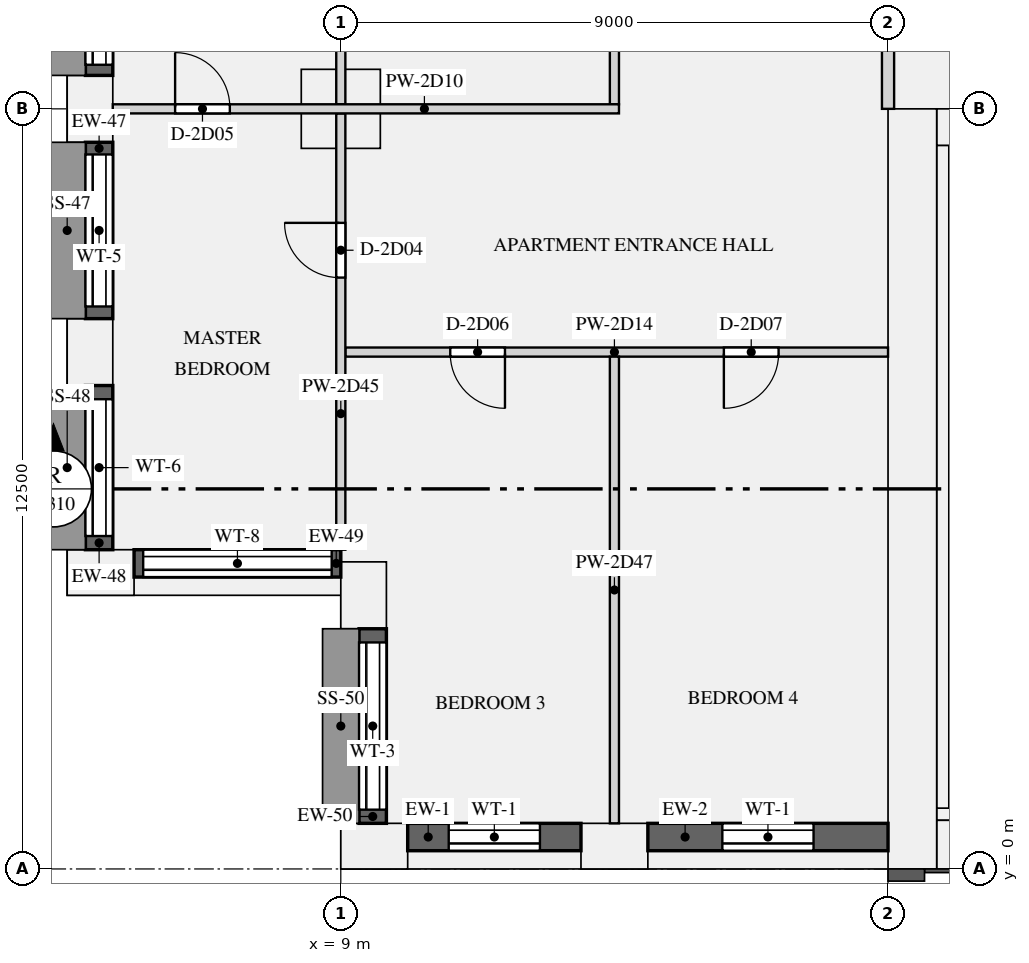
"""IFC4 building model, lengths in metres.
Left out: names, types, materials, properties, quantities, classifications, styles, units other than length and angle.
Written with IfcOpenShell. Run it as: python <this file> out.ifc"""

import sys

from ifc_helpers import new_model, si_unit, direction, frame, frame_2d, origin, origin_2d, place, context, subcontext, project, spatial, rectangle, extrude, element, fill, save


model = new_model("IFC4")
c1 = context("Model", 3, precision=1e-05, world=origin(), true_north=direction((0.0, 1.0)))
c2 = subcontext(c1, "Body", "Model", "MODEL_VIEW")
j1 = project(units=[si_unit("LENGTHUNIT", "METRE"), si_unit("PLANEANGLEUNIT", "RADIAN")], contexts=[c1])
p1 = place(None, origin())
s1 = spatial("IfcSite", under=j1, at=p1, CompositionType="ELEMENT")
p2 = place(p1, origin())
s2 = spatial("IfcBuilding", under=s1, at=p2, CompositionType="ELEMENT")
p3 = place(p2, frame((0.0, 0.0, 111.9)))
s3 = spatial("IfcBuildingStorey", under=s2, at=p3, CompositionType="ELEMENT", Elevation=111.9)
for number, where, z_axis, x_axis in (
    (1, (9.55, 0.375, 0.0), (0.0, 0.0, 1.0), (1.0, 0.0, 0.0)),
    (2, (13.5, 0.375, 0.0), (0.0, 0.0, 1.0), (1.0, 0.0, 0.0)),
    (3, (4.875, 12.5, 0.0), (0.0, 0.0, 1.0), (0.0, -1.0, 0.0)),
    (4, (4.875, 8.5, 0.0), (0.0, 0.0, 1.0), (0.0, -1.0, 0.0)),
    (5, (5.05, 4.875, 0.0), (0.0, 0.0, 1.0), (1.0, 0.0, 0.0)),
    (6, (9.375, 4.5, 0.0), (0.0, 0.0, 1.0), (0.0, -1.0, 0.0)),
):
    element("IfcColumn", number, at=place(p3, frame(where, z_axis=z_axis, x_axis=x_axis)), inside=s3, PredefinedType="USERDEFINED", context=c2, shape_type="SweptSolid", body=[
        extrude(rectangle(XDim=1.1, YDim=0.75, at=origin_2d()), origin(), (0.0, 0.0, 1.0), 3.15),
    ])
p4 = place(p3, frame((9.0, 12.5, 0.0), z_axis=(0.0, 0.0, 1.0), x_axis=(1.0, 0.0, 0.0)))
e7 = element("IfcColumn", 7, at=p4, inside=s3, PredefinedType="COLUMN", context=c2, shape_type="SweptSolid", body=[
    extrude(rectangle(XDim=1.3, YDim=1.3, at=origin_2d()), origin(), (0.0, 0.0, 1.0), 3.15),
])
p5 = place(p3, frame((18.4, 0.0, 0.0), z_axis=(0.0, 0.0, 1.0), x_axis=(0.0, 1.0, 0.0)))
e8 = element("IfcWall", 8, at=p5, inside=s3, PredefinedType="SHEAR", context=c2, shape_type="SweptSolid", body=[
    extrude(rectangle(XDim=12.5, YDim=0.8, at=frame_2d((6.25, 0.0))), origin(), (0.0, 0.0, 1.0), 3.15),
])
p6 = place(p3, frame((18.8, 0.4, 0.0), z_axis=(0.0, 0.0, 1.0), x_axis=(1.0, 0.0, 0.0)))
e9 = element("IfcWall", 9, at=p6, inside=s3, PredefinedType="SHEAR", context=c2, shape_type="SweptSolid", body=[
    extrude(rectangle(XDim=34.4, YDim=0.8, at=frame_2d((17.2, 0.0))), origin(), (0.0, 0.0, 1.0), 3.15),
])
p7 = place(p3, frame((18.8, 12.2, 0.0), z_axis=(0.0, 0.0, 1.0), x_axis=(1.0, 0.0, 0.0)))
e10 = element("IfcWall", 10, at=p7, inside=s3, PredefinedType="SHEAR", context=c2, shape_type="SweptSolid", body=[
    extrude(rectangle(XDim=34.4, YDim=0.6, at=frame_2d((17.2, 0.0))), origin(), (0.0, 0.0, 1.0), 3.15),
])
p8 = place(p7, frame((24.375, 0.0, 0.0)))
e11 = element("IfcOpeningElement", 11, at=p8, cuts=e10, PredefinedType="OPENING", context=c2, shape_type="SweptSolid", body=[
    extrude(rectangle(XDim=1.1, YDim=2.1, at=frame_2d((0.55, 1.05))), frame((0.0, 0.31, 0.0), z_axis=(0.0, -1.0, 0.0), x_axis=(1.0, 0.0, 0.0)), (0.0, 0.0, 1.0), 0.62),
])
p9 = place(p7, frame((26.625, 0.0, 0.0)))
e12 = element("IfcOpeningElement", 12, at=p9, cuts=e10, PredefinedType="OPENING", context=c2, shape_type="SweptSolid", body=[
    extrude(rectangle(XDim=1.1, YDim=2.1, at=frame_2d((0.55, 1.05))), frame((0.0, 0.31, 0.0), z_axis=(0.0, -1.0, 0.0), x_axis=(1.0, 0.0, 0.0)), (0.0, 0.0, 1.0), 0.62),
])
p10 = place(p7, frame((28.875, 0.0, 0.0)))
e13 = element("IfcOpeningElement", 13, at=p10, cuts=e10, PredefinedType="OPENING", context=c2, shape_type="SweptSolid", body=[
    extrude(rectangle(XDim=1.1, YDim=2.1, at=frame_2d((0.55, 1.05))), frame((0.0, 0.31, 0.0), z_axis=(0.0, -1.0, 0.0), x_axis=(1.0, 0.0, 0.0)), (0.0, 0.0, 1.0), 0.62),
])
p11 = place(p7, frame((8.75, 0.0, 0.0)))
e14 = element("IfcOpeningElement", 14, at=p11, cuts=e10, PredefinedType="OPENING", context=c2, shape_type="SweptSolid", body=[
    extrude(rectangle(XDim=0.9, YDim=2.1, at=frame_2d((0.45, 1.05))), frame((0.0, 0.31, 0.0), z_axis=(0.0, -1.0, 0.0), x_axis=(1.0, 0.0, 0.0)), (0.0, 0.0, 1.0), 0.62),
])
p12 = place(p7, frame((1.35, 0.0, 0.0)))
e15 = element("IfcOpeningElement", 15, at=p12, cuts=e10, PredefinedType="OPENING", context=c2, shape_type="SweptSolid", body=[
    extrude(rectangle(XDim=1.2, YDim=2.1, at=frame_2d((0.6, 1.05))), frame((0.0, 0.31, 0.0), z_axis=(0.0, -1.0, 0.0), x_axis=(1.0, 0.0, 0.0)), (0.0, 0.0, 1.0), 0.62),
])
p13 = place(p7, frame((31.85, 0.0, 0.0)))
e16 = element("IfcOpeningElement", 16, at=p13, cuts=e10, PredefinedType="OPENING", context=c2, shape_type="SweptSolid", body=[
    extrude(rectangle(XDim=1.2, YDim=2.1, at=frame_2d((0.6, 1.05))), frame((0.0, 0.31, 0.0), z_axis=(0.0, -1.0, 0.0), x_axis=(1.0, 0.0, 0.0)), (0.0, 0.0, 1.0), 0.62),
])
p14 = place(p3, frame((18.9, 1.0, 0.0), z_axis=(0.0, 0.0, 1.0), x_axis=(0.0, 1.0, 0.0)))
e17 = element("IfcWall", 17, at=p14, inside=s3, PredefinedType="SHEAR", context=c2, shape_type="SweptSolid", body=[
    extrude(rectangle(XDim=10.9, YDim=0.2, at=frame_2d((5.45, 0.0))), origin(), (0.0, 0.0, 1.0), 3.15),
])
p15 = place(p3, frame((18.8, 0.9, 0.0), z_axis=(0.0, 0.0, 1.0), x_axis=(1.0, 0.0, 0.0)))
e18 = element("IfcWall", 18, at=p15, inside=s3, PredefinedType="SHEAR", context=c2, shape_type="SweptSolid", body=[
    extrude(rectangle(XDim=34.4, YDim=0.2, at=frame_2d((17.2, 0.0))), origin(), (0.0, 0.0, 1.0), 3.15),
])
p16 = place(p3, frame((19.0, 3.4, 0.0), z_axis=(0.0, 0.0, 1.0), x_axis=(1.0, 0.0, 0.0)))
e19 = element("IfcWall", 19, at=p16, inside=s3, PredefinedType="SHEAR", context=c2, shape_type="SweptSolid", body=[
    extrude(rectangle(XDim=2.55, YDim=0.3, at=frame_2d((1.275, 0.0))), origin(), (0.0, 0.0, 1.0), 3.15),
])
p17 = place(p16, frame((0.675, 0.0, 0.0)))
e20 = element("IfcOpeningElement", 20, at=p17, cuts=e19, PredefinedType="OPENING", context=c2, shape_type="SweptSolid", body=[
    extrude(rectangle(XDim=1.2, YDim=2.1, at=frame_2d((0.6, 1.05))), frame((0.0, 0.16, 0.0), z_axis=(0.0, -1.0, 0.0), x_axis=(1.0, 0.0, 0.0)), (0.0, 0.0, 1.0), 0.32),
])
p18 = place(p3, frame((10.1, 0.525, 0.9), z_axis=(0.0, 0.0, 1.0), x_axis=(1.0, 0.0, 0.0)))
e21 = element("IfcWall", 21, at=p18, inside=s3, PredefinedType="SOLIDWALL", context=c2, shape_type="SweptSolid", body=[
    extrude(rectangle(XDim=2.85, YDim=0.45, at=frame_2d((1.425, 0.0))), origin(), (0.0, 0.0, 1.0), 1.93),
])
p19 = place(p18, frame((0.675, 0.0, 0.15)))
e22 = element("IfcOpeningElement", 22, at=p19, cuts=e21, PredefinedType="OPENING", context=c2, shape_type="SweptSolid", body=[
    extrude(rectangle(XDim=1.5, YDim=1.5, at=frame_2d((0.75, 0.75))), frame((0.0, 0.235, 0.0), z_axis=(0.0, -1.0, 0.0), x_axis=(1.0, 0.0, 0.0)), (0.0, 0.0, 1.0), 0.47),
])
p20 = place(p3, frame((14.05, 0.525, 0.9), z_axis=(0.0, 0.0, 1.0), x_axis=(1.0, 0.0, 0.0)))
e23 = element("IfcWall", 23, at=p20, inside=s3, PredefinedType="SOLIDWALL", context=c2, shape_type="SweptSolid", body=[
    extrude(rectangle(XDim=3.95, YDim=0.45, at=frame_2d((1.975, 0.0))), origin(), (0.0, 0.0, 1.0), 1.93),
])
p21 = place(p20, frame((1.225, 0.0, 0.15)))
e24 = element("IfcOpeningElement", 24, at=p21, cuts=e23, PredefinedType="OPENING", context=c2, shape_type="SweptSolid", body=[
    extrude(rectangle(XDim=1.5, YDim=1.5, at=frame_2d((0.75, 0.75))), frame((0.0, 0.235, 0.0), z_axis=(0.0, -1.0, 0.0), x_axis=(1.0, 0.0, 0.0)), (0.0, 0.0, 1.0), 0.47),
])
p22 = place(p3, frame((5.025, 15.4, 0.9), z_axis=(0.0, 0.0, 1.0), x_axis=(0.0, -1.0, 0.0)))
e25 = element("IfcWall", 25, at=p22, inside=s3, PredefinedType="SOLIDWALL", context=c2, shape_type="SweptSolid", body=[
    extrude(rectangle(XDim=2.35, YDim=0.45, at=frame_2d((1.175, 0.0))), origin(), (0.0, 0.0, 1.0), 1.93),
])
p23 = place(p22, frame((0.175, 0.0, 0.15)))
e26 = element("IfcOpeningElement", 26, at=p23, cuts=e25, PredefinedType="OPENING", context=c2, shape_type="SweptSolid", body=[
    extrude(rectangle(XDim=2.0, YDim=1.5, at=frame_2d((1.0, 0.75))), frame((0.0, 0.235, 0.0), z_axis=(0.0, -1.0, 0.0), x_axis=(1.0, 0.0, 0.0)), (0.0, 0.0, 1.0), 0.47),
])
p24 = place(p3, frame((5.025, 11.95, 0.9), z_axis=(0.0, 0.0, 1.0), x_axis=(0.0, -1.0, 0.0)))
e27 = element("IfcWall", 27, at=p24, inside=s3, PredefinedType="SOLIDWALL", context=c2, shape_type="SweptSolid", body=[
    extrude(rectangle(XDim=2.9, YDim=0.45, at=frame_2d((1.45, 0.0))), origin(), (0.0, 0.0, 1.0), 1.93),
])
p25 = place(p24, frame((0.2, 0.0, 0.15)))
e28 = element("IfcOpeningElement", 28, at=p25, cuts=e27, PredefinedType="OPENING", context=c2, shape_type="SweptSolid", body=[
    extrude(rectangle(XDim=2.5, YDim=1.5, at=frame_2d((1.25, 0.75))), frame((0.0, 0.235, 0.0), z_axis=(0.0, -1.0, 0.0), x_axis=(1.0, 0.0, 0.0)), (0.0, 0.0, 1.0), 0.47),
])
p26 = place(p3, frame((5.025, 7.95, 0.9), z_axis=(0.0, 0.0, 1.0), x_axis=(0.0, -1.0, 0.0)))
e29 = element("IfcWall", 29, at=p26, inside=s3, PredefinedType="SOLIDWALL", context=c2, shape_type="SweptSolid", body=[
    extrude(rectangle(XDim=2.7, YDim=0.45, at=frame_2d((1.35, 0.0))), origin(), (0.0, 0.0, 1.0), 1.93),
])
p27 = place(p26, frame((0.225, 0.0, 0.15)))
e30 = element("IfcOpeningElement", 30, at=p27, cuts=e29, PredefinedType="OPENING", context=c2, shape_type="SweptSolid", body=[
    extrude(rectangle(XDim=2.25, YDim=1.5, at=frame_2d((1.125, 0.75))), frame((0.0, 0.235, 0.0), z_axis=(0.0, -1.0, 0.0), x_axis=(1.0, 0.0, 0.0)), (0.0, 0.0, 1.0), 0.47),
])
p28 = place(p3, frame((5.6, 5.025, 0.9), z_axis=(0.0, 0.0, 1.0), x_axis=(1.0, 0.0, 0.0)))
e31 = element("IfcWall", 31, at=p28, inside=s3, PredefinedType="SOLIDWALL", context=c2, shape_type="SweptSolid", body=[
    extrude(rectangle(XDim=3.4, YDim=0.45, at=frame_2d((1.7, 0.0))), origin(), (0.0, 0.0, 1.0), 1.93),
])
p29 = place(p28, frame((0.15, 0.0, 0.15)))
e32 = element("IfcOpeningElement", 32, at=p29, cuts=e31, PredefinedType="OPENING", context=c2, shape_type="SweptSolid", body=[
    extrude(rectangle(XDim=3.1, YDim=1.5, at=frame_2d((1.55, 0.75))), frame((0.0, 0.235, 0.0), z_axis=(0.0, -1.0, 0.0), x_axis=(1.0, 0.0, 0.0)), (0.0, 0.0, 1.0), 0.47),
])
p30 = place(p3, frame((9.525, 3.95, 0.9), z_axis=(0.0, 0.0, 1.0), x_axis=(0.0, -1.0, 0.0)))
e33 = element("IfcWall", 33, at=p30, inside=s3, PredefinedType="SOLIDWALL", context=c2, shape_type="SweptSolid", body=[
    extrude(rectangle(XDim=3.2, YDim=0.45, at=frame_2d((1.6, 0.0))), origin(), (0.0, 0.0, 1.0), 1.93),
])
p31 = place(p30, frame((0.225, 0.0, 0.15)))
e34 = element("IfcOpeningElement", 34, at=p31, cuts=e33, PredefinedType="OPENING", context=c2, shape_type="SweptSolid", body=[
    extrude(rectangle(XDim=2.75, YDim=1.5, at=frame_2d((1.375, 0.75))), frame((0.0, 0.235, 0.0), z_axis=(0.0, -1.0, 0.0), x_axis=(1.0, 0.0, 0.0)), (0.0, 0.0, 1.0), 0.47),
])
p32 = place(p3, frame((18.0, 12.5, 0.0), z_axis=(0.0, 0.0, 1.0), x_axis=(0.0, 1.0, 0.0)))
e35 = element("IfcWall", 35, at=p32, inside=s3, PredefinedType="PARTITIONING", context=c2, shape_type="SweptSolid", body=[
    extrude(rectangle(XDim=3.4, YDim=0.2, at=frame_2d((1.7, 0.0))), origin(), (0.0, 0.0, 1.0), 2.83),
])
p33 = place(p3, frame((5.25, 12.5, 0.0), z_axis=(0.0, 0.0, 1.0), x_axis=(1.0, 0.0, 0.0)))
e36 = element("IfcWall", 36, at=p33, inside=s3, PredefinedType="PARTITIONING", context=c2, shape_type="SweptSolid", body=[
    extrude(rectangle(XDim=8.325, YDim=0.15, at=frame_2d((4.163, 0.0))), origin(), (0.0, 0.0, 1.0), 2.83),
])
p34 = place(p33, frame((1.025, 0.0, 0.0)))
e37 = element("IfcOpeningElement", 37, at=p34, cuts=e36, PredefinedType="OPENING", context=c2, shape_type="SweptSolid", body=[
    extrude(rectangle(XDim=0.9, YDim=2.1, at=frame_2d((0.45, 1.05))), frame((0.0, 0.085, 0.0), z_axis=(0.0, -1.0, 0.0), x_axis=(1.0, 0.0, 0.0)), (0.0, 0.0, 1.0), 0.17),
])
p35 = place(p3, frame((9.075, 8.5, 0.0), z_axis=(0.0, 0.0, 1.0), x_axis=(1.0, 0.0, 0.0)))
e38 = element("IfcWall", 38, at=p35, inside=s3, PredefinedType="PARTITIONING", context=c2, shape_type="SweptSolid", body=[
    extrude(rectangle(XDim=8.925, YDim=0.15, at=frame_2d((4.462, 0.0))), origin(), (0.0, 0.0, 1.0), 2.83),
])
p36 = place(p35, frame((1.725, 0.0, 0.0)))
e39 = element("IfcOpeningElement", 39, at=p36, cuts=e38, PredefinedType="OPENING", context=c2, shape_type="SweptSolid", body=[
    extrude(rectangle(XDim=0.9, YDim=2.1, at=frame_2d((0.45, 1.05))), frame((0.0, 0.085, 0.0), z_axis=(0.0, -1.0, 0.0), x_axis=(1.0, 0.0, 0.0)), (0.0, 0.0, 1.0), 0.17),
])
p37 = place(p35, frame((6.225, 0.0, 0.0)))
e40 = element("IfcOpeningElement", 40, at=p37, cuts=e38, PredefinedType="OPENING", context=c2, shape_type="SweptSolid", body=[
    extrude(rectangle(XDim=0.9, YDim=2.1, at=frame_2d((0.45, 1.05))), frame((0.0, 0.085, 0.0), z_axis=(0.0, -1.0, 0.0), x_axis=(1.0, 0.0, 0.0)), (0.0, 0.0, 1.0), 0.17),
])
p38 = place(p3, frame((9.0, 5.25, 0.0), z_axis=(0.0, 0.0, 1.0), x_axis=(0.0, 1.0, 0.0)))
e41 = element("IfcWall", 41, at=p38, inside=s3, PredefinedType="PARTITIONING", context=c2, shape_type="SweptSolid", body=[
    extrude(rectangle(XDim=7.175, YDim=0.15, at=frame_2d((3.587, 0.0))), origin(), (0.0, 0.0, 1.0), 2.83),
])
p39 = place(p38, frame((4.475, 0.0, 0.0)))
e42 = element("IfcOpeningElement", 42, at=p39, cuts=e41, PredefinedType="OPENING", context=c2, shape_type="SweptSolid", body=[
    extrude(rectangle(XDim=0.9, YDim=2.1, at=frame_2d((0.45, 1.05))), frame((0.0, 0.085, 0.0), z_axis=(0.0, -1.0, 0.0), x_axis=(1.0, 0.0, 0.0)), (0.0, 0.0, 1.0), 0.17),
])
p40 = place(p3, frame((9.0, 12.575, 0.0), z_axis=(0.0, 0.0, 1.0), x_axis=(0.0, 1.0, 0.0)))
e43 = element("IfcWall", 43, at=p40, inside=s3, PredefinedType="PARTITIONING", context=c2, shape_type="SweptSolid", body=[
    extrude(rectangle(XDim=3.85, YDim=0.15, at=frame_2d((1.925, 0.0))), origin(), (0.0, 0.0, 1.0), 2.83),
])
p41 = place(p3, frame((13.5, 0.75, 0.0), z_axis=(0.0, 0.0, 1.0), x_axis=(0.0, 1.0, 0.0)))
e44 = element("IfcWall", 44, at=p41, inside=s3, PredefinedType="PARTITIONING", context=c2, shape_type="SweptSolid", body=[
    extrude(rectangle(XDim=7.675, YDim=0.15, at=frame_2d((3.837, 0.0))), origin(), (0.0, 0.0, 1.0), 2.83),
])
p42 = place(p3, frame((13.5, 12.575, 0.0), z_axis=(0.0, 0.0, 1.0), x_axis=(0.0, 1.0, 0.0)))
e45 = element("IfcWall", 45, at=p42, inside=s3, PredefinedType="PARTITIONING", context=c2, shape_type="SweptSolid", body=[
    extrude(rectangle(XDim=10.325, YDim=0.15, at=frame_2d((5.163, 0.0))), origin(), (0.0, 0.0, 1.0), 2.83),
])
p43 = place(p42, frame((1.475, 0.0, 0.0)))
e46 = element("IfcOpeningElement", 46, at=p43, cuts=e45, PredefinedType="OPENING", context=c2, shape_type="SweptSolid", body=[
    extrude(rectangle(XDim=0.9, YDim=2.1, at=frame_2d((0.45, 1.05))), frame((0.0, 0.085, 0.0), z_axis=(0.0, -1.0, 0.0), x_axis=(1.0, 0.0, 0.0)), (0.0, 0.0, 1.0), 0.17),
])
p44 = place(p42, frame((6.45, 0.0, 0.0)))
e47 = element("IfcOpeningElement", 47, at=p44, cuts=e45, PredefinedType="OPENING", context=c2, shape_type="SweptSolid", body=[
    extrude(rectangle(XDim=1.5, YDim=2.1, at=frame_2d((0.75, 1.05))), frame((0.0, 0.085, 0.0), z_axis=(0.0, -1.0, 0.0), x_axis=(1.0, 0.0, 0.0)), (0.0, 0.0, 1.0), 0.17),
])
p45 = place(p19, origin())
e48 = element("IfcWindow", 48, at=p45, inside=s3, PartitioningType="SINGLE_PANEL", PredefinedType="WINDOW", context=c2, shape_type="SweptSolid", body=[
    extrude(rectangle(XDim=1.5, YDim=1.5, at=frame_2d((0.75, 0.75))), frame((0.0, -0.065, 0.0), z_axis=(0.0, -1.0, 0.0), x_axis=(1.0, 0.0, 0.0)), (0.0, 0.0, 1.0), 0.06),
])
fill(e22, e48)
p46 = place(p21, origin())
e49 = element("IfcWindow", 49, at=p46, inside=s3, PartitioningType="SINGLE_PANEL", PredefinedType="WINDOW", context=c2, shape_type="SweptSolid", body=[
    extrude(rectangle(XDim=1.5, YDim=1.5, at=frame_2d((0.75, 0.75))), frame((0.0, -0.065, 0.0), z_axis=(0.0, -1.0, 0.0), x_axis=(1.0, 0.0, 0.0)), (0.0, 0.0, 1.0), 0.06),
])
fill(e24, e49)
p47 = place(p23, origin())
e50 = element("IfcWindow", 50, at=p47, inside=s3, PartitioningType="SINGLE_PANEL", PredefinedType="WINDOW", context=c2, shape_type="SweptSolid", body=[
    extrude(rectangle(XDim=2.0, YDim=1.5, at=frame_2d((1.0, 0.75))), frame((0.0, -0.065, 0.0), z_axis=(0.0, -1.0, 0.0), x_axis=(1.0, 0.0, 0.0)), (0.0, 0.0, 1.0), 0.06),
])
fill(e26, e50)
p48 = place(p25, origin())
e51 = element("IfcWindow", 51, at=p48, inside=s3, PartitioningType="SINGLE_PANEL", PredefinedType="WINDOW", context=c2, shape_type="SweptSolid", body=[
    extrude(rectangle(XDim=2.5, YDim=1.5, at=frame_2d((1.25, 0.75))), frame((0.0, -0.065, 0.0), z_axis=(0.0, -1.0, 0.0), x_axis=(1.0, 0.0, 0.0)), (0.0, 0.0, 1.0), 0.06),
])
fill(e28, e51)
p49 = place(p27, origin())
e52 = element("IfcWindow", 52, at=p49, inside=s3, PartitioningType="SINGLE_PANEL", PredefinedType="WINDOW", context=c2, shape_type="SweptSolid", body=[
    extrude(rectangle(XDim=2.25, YDim=1.5, at=frame_2d((1.125, 0.75))), frame((0.0, -0.065, 0.0), z_axis=(0.0, -1.0, 0.0), x_axis=(1.0, 0.0, 0.0)), (0.0, 0.0, 1.0), 0.06),
])
fill(e30, e52)
p50 = place(p29, origin())
e53 = element("IfcWindow", 53, at=p50, inside=s3, PartitioningType="SINGLE_PANEL", PredefinedType="WINDOW", context=c2, shape_type="SweptSolid", body=[
    extrude(rectangle(XDim=3.1, YDim=1.5, at=frame_2d((1.55, 0.75))), frame((0.0, -0.065, 0.0), z_axis=(0.0, -1.0, 0.0), x_axis=(1.0, 0.0, 0.0)), (0.0, 0.0, 1.0), 0.06),
])
fill(e32, e53)
p51 = place(p31, origin())
e54 = element("IfcWindow", 54, at=p51, inside=s3, PartitioningType="SINGLE_PANEL", PredefinedType="WINDOW", context=c2, shape_type="SweptSolid", body=[
    extrude(rectangle(XDim=2.75, YDim=1.5, at=frame_2d((1.375, 0.75))), frame((0.0, -0.065, 0.0), z_axis=(0.0, -1.0, 0.0), x_axis=(1.0, 0.0, 0.0)), (0.0, 0.0, 1.0), 0.06),
])
fill(e34, e54)
p52 = place(p39, origin())
e55 = element("IfcDoor", 55, at=p52, inside=s3, OperationType="SINGLE_SWING_RIGHT", PredefinedType="DOOR", context=c2, shape_type="SweptSolid", body=[
    extrude(rectangle(XDim=0.9, YDim=2.1, at=frame_2d((0.45, 1.05))), frame((0.0, 0.025, 0.0), z_axis=(0.0, -1.0, 0.0), x_axis=(1.0, 0.0, 0.0)), (0.0, 0.0, 1.0), 0.05),
])
fill(e42, e55)
p53 = place(p34, origin())
e56 = element("IfcDoor", 56, at=p53, inside=s3, OperationType="SINGLE_SWING_LEFT", PredefinedType="DOOR", context=c2, shape_type="SweptSolid", body=[
    extrude(rectangle(XDim=0.9, YDim=2.1, at=frame_2d((0.45, 1.05))), frame((0.0, 0.025, 0.0), z_axis=(0.0, -1.0, 0.0), x_axis=(1.0, 0.0, 0.0)), (0.0, 0.0, 1.0), 0.05),
])
fill(e37, e56)
p54 = place(p36, frame((0.9, 0.0, 0.0), z_axis=(0.0, 0.0, 1.0), x_axis=(-1.0, 0.0, 0.0)))
e57 = element("IfcDoor", 57, at=p54, inside=s3, OperationType="SINGLE_SWING_LEFT", PredefinedType="DOOR", context=c2, shape_type="SweptSolid", body=[
    extrude(rectangle(XDim=0.9, YDim=2.1, at=frame_2d((0.45, 1.05))), frame((0.0, 0.025, 0.0), z_axis=(0.0, -1.0, 0.0), x_axis=(1.0, 0.0, 0.0)), (0.0, 0.0, 1.0), 0.05),
])
fill(e39, e57)
p55 = place(p37, frame((0.9, 0.0, 0.0), z_axis=(0.0, 0.0, 1.0), x_axis=(-1.0, 0.0, 0.0)))
e58 = element("IfcDoor", 58, at=p55, inside=s3, OperationType="SINGLE_SWING_RIGHT", PredefinedType="DOOR", context=c2, shape_type="SweptSolid", body=[
    extrude(rectangle(XDim=0.9, YDim=2.1, at=frame_2d((0.45, 1.05))), frame((0.0, 0.025, 0.0), z_axis=(0.0, -1.0, 0.0), x_axis=(1.0, 0.0, 0.0)), (0.0, 0.0, 1.0), 0.05),
])
fill(e40, e58)
save(model, sys.argv[1])
